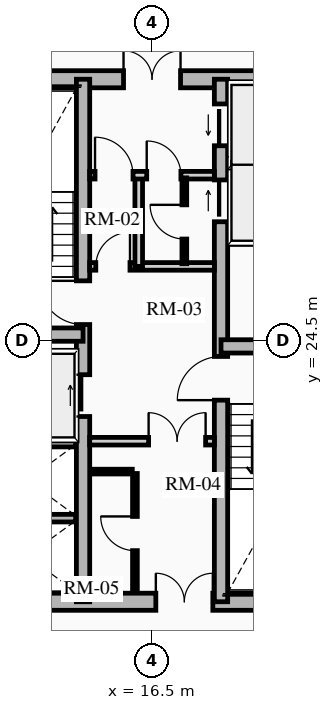
"""IFC4 building model, lengths in metres.
Left out: names, types, materials, properties, quantities, classifications, styles, units other than length and angle.
Written with IfcOpenShell. Run it as: python <this file> out.ifc"""

import sys

from ifc_helpers import new_model, si_unit, direction, frame, frame_2d, origin, place, context, subcontext, project, spatial, rectangle, extrude, source, transform, mapped, element, fill, save


model = new_model("IFC4")
c1 = context("Model", 3, precision=1e-05, world=origin(), true_north=direction((0.0, 1.0)))
c2 = subcontext(c1, "Body", "Model", "MODEL_VIEW")
j1 = project(units=[si_unit("LENGTHUNIT", "METRE"), si_unit("PLANEANGLEUNIT", "RADIAN")], contexts=[c1])
p1 = place(None, origin())
s1 = spatial("IfcSite", under=j1, at=p1, CompositionType="ELEMENT")
p2 = place(p1, origin())
s2 = spatial("IfcBuilding", under=s1, at=p2, CompositionType="ELEMENT")
p3 = place(p2, frame((0.0, 0.0, 122.53)))
s3 = spatial("IfcBuildingStorey", under=s2, at=p3, CompositionType="ELEMENT", Elevation=122.53)
p4 = place(p3, frame((11.15, 17.625, 0.0), z_axis=(0.0, 0.0, 1.0), x_axis=(1.0, 0.0, 0.0)))
e1 = element("IfcWall", 1, at=p4, inside=s3, PredefinedType="SHEAR", context=c2, shape_type="SweptSolid", body=[
    extrude(rectangle(XDim=10.7, YDim=0.45, at=frame_2d((5.35, 0.0))), origin(), (0.0, 0.0, 1.0), 2.91),
])
m1 = source(origin(), c2, "Body", "SweptSolid", [
    extrude(rectangle(XDim=1.5, YDim=2.02, at=frame_2d((0.75, 1.01))), frame((0.0, 0.235, 0.0), z_axis=(0.0, -1.0, 0.0), x_axis=(1.0, 0.0, 0.0)), (0.0, 0.0, 1.0), 0.47),
])
p5 = place(p4, frame((5.45, 0.0, 0.0)))
e2 = element("IfcOpeningElement", 2, at=p5, cuts=e1, PredefinedType="OPENING", context=c2, shape_type="MappedRepresentation", body=[
    mapped(m1, transform((0.0, 0.0, 0.0), x_axis=(1.0, 0.0, 0.0), y_axis=(0.0, 1.0, 0.0), z_axis=(0.0, 0.0, 1.0), scale=1.0)),
])
p6 = place(p3, frame((11.15, 31.375, 0.0), z_axis=(0.0, 0.0, 1.0), x_axis=(1.0, 0.0, 0.0)))
e3 = element("IfcWall", 3, at=p6, inside=s3, PredefinedType="SHEAR", context=c2, shape_type="SweptSolid", body=[
    extrude(rectangle(XDim=10.7, YDim=0.45, at=frame_2d((5.35, 0.0))), origin(), (0.0, 0.0, 1.0), 2.91),
])
p7 = place(p6, frame((4.6, 0.0, 0.0)))
e4 = element("IfcOpeningElement", 4, at=p7, cuts=e3, PredefinedType="OPENING", context=c2, shape_type="MappedRepresentation", body=[
    mapped(m1, transform((0.0, 0.0, 0.0), x_axis=(1.0, 0.0, 0.0), y_axis=(0.0, 1.0, 0.0), z_axis=(0.0, 0.0, 1.0), scale=1.0)),
])
p8 = place(p3, frame((14.685, 17.625, 0.0), z_axis=(0.0, 0.0, 1.0), x_axis=(0.0, 1.0, 0.0)))
e5 = element("IfcWall", 5, at=p8, inside=s3, PredefinedType="SHEAR", context=c2, shape_type="SweptSolid", body=[
    extrude(rectangle(XDim=13.75, YDim=0.35, at=frame_2d((6.875, 0.0))), origin(), (0.0, 0.0, 1.0), 2.91),
])
m2 = source(origin(), c2, "Body", "SweptSolid", [
    extrude(rectangle(XDim=1.1, YDim=2.015, at=frame_2d((0.55, 1.007))), frame((0.0, 0.185, 0.0), z_axis=(0.0, -1.0, 0.0), x_axis=(1.0, 0.0, 0.0)), (0.0, 0.0, 1.0), 0.37),
])
p9 = place(p8, frame((4.875, 0.0, 0.0)))
e6 = element("IfcOpeningElement", 6, at=p9, cuts=e5, PredefinedType="OPENING", context=c2, shape_type="MappedRepresentation", body=[
    mapped(m2, transform((0.0, 0.0, 0.0), x_axis=(1.0, 0.0, 0.0), y_axis=(0.0, 1.0, 0.0), z_axis=(0.0, 0.0, 1.0), scale=1.0)),
])
m3 = source(origin(), c2, "Body", "SweptSolid", [
    extrude(rectangle(XDim=1.15, YDim=2.02, at=frame_2d((0.575, 1.01))), frame((0.0, 0.185, 0.0), z_axis=(0.0, -1.0, 0.0), x_axis=(1.0, 0.0, 0.0)), (0.0, 0.0, 1.0), 0.37),
])
p10 = place(p8, frame((7.295, 0.0, 0.0)))
e7 = element("IfcOpeningElement", 7, at=p10, cuts=e5, PredefinedType="OPENING", context=c2, shape_type="MappedRepresentation", body=[
    mapped(m3, transform((0.0, 0.0, 0.0), x_axis=(1.0, 0.0, 0.0), y_axis=(0.0, 1.0, 0.0), z_axis=(0.0, 0.0, 1.0), scale=1.0)),
])
p11 = place(p3, frame((18.315, 17.625, 0.0), z_axis=(0.0, 0.0, 1.0), x_axis=(0.0, 1.0, 0.0)))
e8 = element("IfcWall", 8, at=p11, inside=s3, PredefinedType="SHEAR", context=c2, shape_type="SweptSolid", body=[
    extrude(rectangle(XDim=13.75, YDim=0.35, at=frame_2d((6.875, 0.0))), origin(), (0.0, 0.0, 1.0), 2.91),
])
p12 = place(p11, frame((10.0, 0.0, 0.0)))
e9 = element("IfcOpeningElement", 9, at=p12, cuts=e8, PredefinedType="OPENING", context=c2, shape_type="MappedRepresentation", body=[
    mapped(m2, transform((0.0, 0.0, 0.0), x_axis=(1.0, 0.0, 0.0), y_axis=(0.0, 1.0, 0.0), z_axis=(0.0, 0.0, 1.0), scale=1.0)),
])
p13 = place(p11, frame((12.0, 0.0, 0.0)))
e10 = element("IfcOpeningElement", 10, at=p13, cuts=e8, PredefinedType="OPENING", context=c2, shape_type="MappedRepresentation", body=[
    mapped(m2, transform((0.0, 0.0, 0.0), x_axis=(1.0, 0.0, 0.0), y_axis=(0.0, 1.0, 0.0), z_axis=(0.0, 0.0, 1.0), scale=1.0)),
])
p14 = place(p11, frame((5.305, 0.0, 0.0)))
e11 = element("IfcOpeningElement", 11, at=p14, cuts=e8, PredefinedType="OPENING", context=c2, shape_type="MappedRepresentation", body=[
    mapped(m3, transform((0.0, 0.0, 0.0), x_axis=(1.0, 0.0, 0.0), y_axis=(0.0, 1.0, 0.0), z_axis=(0.0, 0.0, 1.0), scale=1.0)),
])
for number, where, z_axis, x_axis in (
    (12, (11.4, 24.655, 0.0), (0.0, 0.0, 1.0), (1.0, 0.0, 0.0)),
    (13, (18.315, 24.345, 0.0), (0.0, 0.0, 1.0), (1.0, 0.0, 0.0)),
):
    element("IfcWall", number, at=place(p3, frame(where, z_axis=z_axis, x_axis=x_axis)), inside=s3, PredefinedType="SHEAR", context=c2, shape_type="SweptSolid", body=[
        extrude(rectangle(XDim=3.285, YDim=0.35, at=frame_2d((1.643, 0.0))), origin(), (0.0, 0.0, 1.0), 2.91),
    ])
for number, where, z_axis, x_axis in (
    (14, (11.52, 21.8, 0.0), (0.0, 0.0, 1.0), (1.0, 0.0, 0.0)),
    (15, (11.52, 19.825, 0.0), (0.0, 0.0, 1.0), (1.0, 0.0, 0.0)),
    (16, (18.51, 27.13, 0.0), (0.0, 0.0, 1.0), (1.0, 0.0, 0.0)),
    (17, (18.51, 29.175, 0.0), (0.0, 0.0, 1.0), (1.0, 0.0, 0.0)),
):
    element("IfcWall", number, at=place(p3, frame(where, z_axis=z_axis, x_axis=x_axis)), inside=s3, PredefinedType="SHEAR", context=c2, shape_type="SweptSolid", body=[
        extrude(rectangle(XDim=2.97, YDim=0.2, at=frame_2d((1.485, 0.0))), origin(), (0.0, 0.0, 1.0), 2.91),
    ])
p15 = place(p3, frame((14.86, 21.85, 0.0), z_axis=(0.0, 0.0, 1.0), x_axis=(1.0, 0.0, 0.0)))
e18 = element("IfcWall", 18, at=p15, inside=s3, PredefinedType="PARTITIONING", context=c2, shape_type="SweptSolid", body=[
    extrude(rectangle(XDim=3.28, YDim=0.2, at=frame_2d((1.64, 0.0))), origin(), (0.0, 0.0, 1.0), 2.615),
])
m4 = source(origin(), c2, "Body", "SweptSolid", [
    extrude(rectangle(XDim=1.5, YDim=2.02, at=frame_2d((0.75, 1.01))), frame((0.0, 0.11, 0.0), z_axis=(0.0, -1.0, 0.0), x_axis=(1.0, 0.0, 0.0)), (0.0, 0.0, 1.0), 0.22),
])
p16 = place(p15, frame((1.55, 0.0, 0.0)))
e19 = element("IfcOpeningElement", 19, at=p16, cuts=e18, PredefinedType="OPENING", context=c2, shape_type="MappedRepresentation", body=[
    mapped(m4, transform((0.0, 0.0, 0.0), x_axis=(1.0, 0.0, 0.0), y_axis=(0.0, 1.0, 0.0), z_axis=(0.0, 0.0, 1.0), scale=1.0)),
])
p17 = place(p3, frame((14.86, 26.45, 0.0), z_axis=(0.0, 0.0, 1.0), x_axis=(1.0, 0.0, 0.0)))
e20 = element("IfcWall", 20, at=p17, inside=s3, PredefinedType="PARTITIONING", context=c2, shape_type="SweptSolid", body=[
    extrude(rectangle(XDim=3.28, YDim=0.2, at=frame_2d((1.64, 0.0))), origin(), (0.0, 0.0, 1.0), 2.615),
])
m5 = source(origin(), c2, "Body", "SweptSolid", [
    extrude(rectangle(XDim=0.9, YDim=2.005, at=frame_2d((0.45, 1.002))), frame((0.0, 0.11, 0.0), z_axis=(0.0, -1.0, 0.0), x_axis=(1.0, 0.0, 0.0)), (0.0, 0.0, 1.0), 0.22),
])
p18 = place(p17, frame((0.16, 0.0, 0.0)))
e21 = element("IfcOpeningElement", 21, at=p18, cuts=e20, PredefinedType="OPENING", context=c2, shape_type="MappedRepresentation", body=[
    mapped(m5, transform((0.0, 0.0, 0.0), x_axis=(1.0, 0.0, 0.0), y_axis=(0.0, 1.0, 0.0), z_axis=(0.0, 0.0, 1.0), scale=1.0)),
])
p19 = place(p3, frame((16.15, 26.45, 0.0), z_axis=(0.0, 0.0, 1.0), x_axis=(0.0, 1.0, 0.0)))
e22 = element("IfcWall", 22, at=p19, inside=s3, PredefinedType="PARTITIONING", context=c2, shape_type="SweptSolid", body=[
    extrude(rectangle(XDim=2.4, YDim=0.2, at=frame_2d((1.2, 0.0))), origin(), (0.0, 0.0, 1.0), 2.615),
])
p20 = place(p3, frame((14.86, 28.85, 0.0), z_axis=(0.0, 0.0, 1.0), x_axis=(1.0, 0.0, 0.0)))
e23 = element("IfcWall", 23, at=p20, inside=s3, PredefinedType="PARTITIONING", context=c2, shape_type="SweptSolid", body=[
    extrude(rectangle(XDim=3.28, YDim=0.2, at=frame_2d((1.64, 0.0))), origin(), (0.0, 0.0, 1.0), 2.615),
])
m6 = source(origin(), c2, "Body", "SweptSolid", [
    extrude(rectangle(XDim=1.0, YDim=2.015, at=frame_2d((0.5, 1.007))), frame((0.0, 0.11, 0.0), z_axis=(0.0, -1.0, 0.0), x_axis=(1.0, 0.0, 0.0)), (0.0, 0.0, 1.0), 0.22),
])
p21 = place(p20, frame((0.14, 0.0, 0.0)))
e24 = element("IfcOpeningElement", 24, at=p21, cuts=e23, PredefinedType="OPENING", context=c2, shape_type="MappedRepresentation", body=[
    mapped(m6, transform((0.0, 0.0, 0.0), x_axis=(1.0, 0.0, 0.0), y_axis=(0.0, 1.0, 0.0), z_axis=(0.0, 0.0, 1.0), scale=1.0)),
])
p22 = place(p20, frame((1.5, 0.0, 0.0)))
e25 = element("IfcOpeningElement", 25, at=p22, cuts=e23, PredefinedType="OPENING", context=c2, shape_type="MappedRepresentation", body=[
    mapped(m5, transform((0.0, 0.0, 0.0), x_axis=(1.0, 0.0, 0.0), y_axis=(0.0, 1.0, 0.0), z_axis=(0.0, 0.0, 1.0), scale=1.0)),
])
p23 = place(p3, frame((16.05, 17.92, 0.0), z_axis=(0.0, 0.0, 1.0), x_axis=(0.0, 1.0, 0.0)))
e26 = element("IfcWall", 26, at=p23, inside=s3, PredefinedType="PARTITIONING", context=c2, shape_type="SweptSolid", body=[
    extrude(rectangle(XDim=3.08, YDim=0.125, at=frame_2d((1.54, 0.0))), origin(), (0.0, 0.0, 1.0), 2.615),
])
m7 = source(origin(), c2, "Body", "SweptSolid", [
    extrude(rectangle(XDim=0.9, YDim=2.005, at=frame_2d((0.45, 1.002))), frame((0.0, 0.073, 0.0), z_axis=(0.0, -1.0, 0.0), x_axis=(1.0, 0.0, 0.0)), (0.0, 0.0, 1.0), 0.145),
])
p24 = place(p23, frame((1.05, 0.0, 0.0)))
e27 = element("IfcOpeningElement", 27, at=p24, cuts=e26, PredefinedType="OPENING", context=c2, shape_type="MappedRepresentation", body=[
    mapped(m7, transform((0.0, 0.0, 0.0), x_axis=(1.0, 0.0, 0.0), y_axis=(0.0, 1.0, 0.0), z_axis=(0.0, 0.0, 1.0), scale=1.0)),
])
p25 = place(p3, frame((14.88, 21.05, 0.0), z_axis=(0.0, 0.0, 1.0), x_axis=(1.0, 0.0, 0.0)))
e28 = element("IfcWall", 28, at=p25, inside=s3, PredefinedType="PARTITIONING", context=c2, shape_type="SweptSolid", body=[
    extrude(rectangle(XDim=1.1, YDim=0.125, at=frame_2d((0.55, 0.0))), origin(), (0.0, 0.0, 1.0), 2.615),
])
p26 = place(p3, frame((17.35, 26.52, 0.0), z_axis=(0.0, 0.0, 1.0), x_axis=(0.0, 1.0, 0.0)))
e29 = element("IfcWall", 29, at=p26, inside=s3, PredefinedType="PARTITIONING", context=c2, shape_type="SweptSolid", body=[
    extrude(rectangle(XDim=2.26, YDim=0.125, at=frame_2d((1.13, 0.0))), origin(), (0.0, 0.0, 1.0), 2.615),
])
p27 = place(p26, frame((0.65, 0.0, 0.0)))
e30 = element("IfcOpeningElement", 30, at=p27, cuts=e29, PredefinedType="OPENING", context=c2, shape_type="MappedRepresentation", body=[
    mapped(m7, transform((0.0, 0.0, 0.0), x_axis=(1.0, 0.0, 0.0), y_axis=(0.0, 1.0, 0.0), z_axis=(0.0, 0.0, 1.0), scale=1.0)),
])
m8 = source(origin(), c2, "Body", "SweptSolid", [
    extrude(rectangle(XDim=1.1, YDim=2.015, at=frame_2d((0.55, 1.007))), frame((0.0, 0.025, 0.0), z_axis=(0.0, -1.0, 0.0), x_axis=(1.0, 0.0, 0.0)), (0.0, 0.0, 1.0), 0.05),
])
p28 = place(p9, origin())
e31 = element("IfcDoor", 31, at=p28, inside=s3, OperationType="SLIDING_TO_RIGHT", PredefinedType="DOOR", context=c2, shape_type="MappedRepresentation", body=[
    mapped(m8, transform((0.0, 0.0, 0.0), x_axis=(1.0, 0.0, 0.0), y_axis=(0.0, 1.0, 0.0), z_axis=(0.0, 0.0, 1.0), scale=1.0)),
])
fill(e6, e31)
p29 = place(p12, origin())
e32 = element("IfcDoor", 32, at=p29, inside=s3, OperationType="SLIDING_TO_RIGHT", PredefinedType="DOOR", context=c2, shape_type="MappedRepresentation", body=[
    mapped(m8, transform((0.0, 0.0, 0.0), x_axis=(1.0, 0.0, 0.0), y_axis=(0.0, 1.0, 0.0), z_axis=(0.0, 0.0, 1.0), scale=1.0)),
])
fill(e9, e32)
p30 = place(p13, origin())
e33 = element("IfcDoor", 33, at=p30, inside=s3, OperationType="SLIDING_TO_LEFT", PredefinedType="DOOR", context=c2, shape_type="MappedRepresentation", body=[
    mapped(m8, transform((0.0, 0.0, 0.0), x_axis=(1.0, 0.0, 0.0), y_axis=(0.0, 1.0, 0.0), z_axis=(0.0, 0.0, 1.0), scale=1.0)),
])
fill(e10, e33)
m9 = source(origin(), c2, "Body", "SweptSolid", [
    extrude(rectangle(XDim=1.15, YDim=2.02, at=frame_2d((0.575, 1.01))), frame((0.0, 0.025, 0.0), z_axis=(0.0, -1.0, 0.0), x_axis=(1.0, 0.0, 0.0)), (0.0, 0.0, 1.0), 0.05),
])
p31 = place(p10, origin())
e34 = element("IfcDoor", 34, at=p31, inside=s3, OperationType="SINGLE_SWING_RIGHT", PredefinedType="DOOR", context=c2, shape_type="MappedRepresentation", body=[
    mapped(m9, transform((0.0, 0.0, 0.0), x_axis=(1.0, 0.0, 0.0), y_axis=(0.0, 1.0, 0.0), z_axis=(0.0, 0.0, 1.0), scale=1.0)),
])
fill(e7, e34)
p32 = place(p14, origin())
e35 = element("IfcDoor", 35, at=p32, inside=s3, OperationType="SINGLE_SWING_LEFT", PredefinedType="DOOR", context=c2, shape_type="MappedRepresentation", body=[
    mapped(m9, transform((0.0, 0.0, 0.0), x_axis=(1.0, 0.0, 0.0), y_axis=(0.0, 1.0, 0.0), z_axis=(0.0, 0.0, 1.0), scale=1.0)),
])
fill(e11, e35)
m10 = source(origin(), c2, "Body", "SweptSolid", [
    extrude(rectangle(XDim=1.5, YDim=2.02, at=frame_2d((0.75, 1.01))), frame((0.0, 0.025, 0.0), z_axis=(0.0, -1.0, 0.0), x_axis=(1.0, 0.0, 0.0)), (0.0, 0.0, 1.0), 0.05),
])
p33 = place(p7, origin())
e36 = element("IfcDoor", 36, at=p33, inside=s3, OperationType="DOUBLE_DOOR_SINGLE_SWING", PredefinedType="DOOR", context=c2, shape_type="MappedRepresentation", body=[
    mapped(m10, transform((0.0, 0.0, 0.0), x_axis=(1.0, 0.0, 0.0), y_axis=(0.0, 1.0, 0.0), z_axis=(0.0, 0.0, 1.0), scale=1.0)),
])
fill(e4, e36)
p34 = place(p5, origin())
e37 = element("IfcDoor", 37, at=p34, inside=s3, OperationType="DOUBLE_DOOR_SINGLE_SWING", PredefinedType="DOOR", context=c2, shape_type="MappedRepresentation", body=[
    mapped(m10, transform((0.0, 0.0, 0.0), x_axis=(1.0, 0.0, 0.0), y_axis=(0.0, 1.0, 0.0), z_axis=(0.0, 0.0, 1.0), scale=1.0)),
])
fill(e2, e37)
p35 = place(p16, origin())
e38 = element("IfcDoor", 38, at=p35, inside=s3, OperationType="DOUBLE_DOOR_SINGLE_SWING", PredefinedType="DOOR", context=c2, shape_type="MappedRepresentation", body=[
    mapped(m10, transform((0.0, 0.0, 0.0), x_axis=(1.0, 0.0, 0.0), y_axis=(0.0, 1.0, 0.0), z_axis=(0.0, 0.0, 1.0), scale=1.0)),
])
fill(e19, e38)
m11 = source(origin(), c2, "Body", "SweptSolid", [
    extrude(rectangle(XDim=0.9, YDim=2.005, at=frame_2d((0.45, 1.002))), frame((0.0, 0.025, 0.0), z_axis=(0.0, -1.0, 0.0), x_axis=(1.0, 0.0, 0.0)), (0.0, 0.0, 1.0), 0.05),
])
p36 = place(p18, origin())
e39 = element("IfcDoor", 39, at=p36, inside=s3, OperationType="SINGLE_SWING_RIGHT", PredefinedType="DOOR", context=c2, shape_type="MappedRepresentation", body=[
    mapped(m11, transform((0.0, 0.0, 0.0), x_axis=(1.0, 0.0, 0.0), y_axis=(0.0, 1.0, 0.0), z_axis=(0.0, 0.0, 1.0), scale=1.0)),
])
fill(e21, e39)
m12 = source(origin(), c2, "Body", "SweptSolid", [
    extrude(rectangle(XDim=1.0, YDim=2.015, at=frame_2d((0.5, 1.007))), frame((0.0, 0.025, 0.0), z_axis=(0.0, -1.0, 0.0), x_axis=(1.0, 0.0, 0.0)), (0.0, 0.0, 1.0), 0.05),
])
p37 = place(p21, origin())
e40 = element("IfcDoor", 40, at=p37, inside=s3, OperationType="SINGLE_SWING_LEFT", PredefinedType="DOOR", context=c2, shape_type="MappedRepresentation", body=[
    mapped(m12, transform((0.0, 0.0, 0.0), x_axis=(1.0, 0.0, 0.0), y_axis=(0.0, 1.0, 0.0), z_axis=(0.0, 0.0, 1.0), scale=1.0)),
])
fill(e24, e40)
p38 = place(p24, origin())
e41 = element("IfcDoor", 41, at=p38, inside=s3, OperationType="SINGLE_SWING_RIGHT", PredefinedType="DOOR", context=c2, shape_type="MappedRepresentation", body=[
    mapped(m11, transform((0.0, 0.0, 0.0), x_axis=(1.0, 0.0, 0.0), y_axis=(0.0, 1.0, 0.0), z_axis=(0.0, 0.0, 1.0), scale=1.0)),
])
fill(e27, e41)
p39 = place(p22, origin())
e42 = element("IfcDoor", 42, at=p39, inside=s3, OperationType="SINGLE_SWING_LEFT", PredefinedType="DOOR", context=c2, shape_type="MappedRepresentation", body=[
    mapped(m11, transform((0.0, 0.0, 0.0), x_axis=(1.0, 0.0, 0.0), y_axis=(0.0, 1.0, 0.0), z_axis=(0.0, 0.0, 1.0), scale=1.0)),
])
fill(e25, e42)
p40 = place(p27, origin())
e43 = element("IfcDoor", 43, at=p40, inside=s3, OperationType="SINGLE_SWING_RIGHT", PredefinedType="DOOR", context=c2, shape_type="MappedRepresentation", body=[
    mapped(m11, transform((0.0, 0.0, 0.0), x_axis=(1.0, 0.0, 0.0), y_axis=(0.0, 1.0, 0.0), z_axis=(0.0, 0.0, 1.0), scale=1.0)),
])
fill(e30, e43)
save(model, sys.argv[1])
